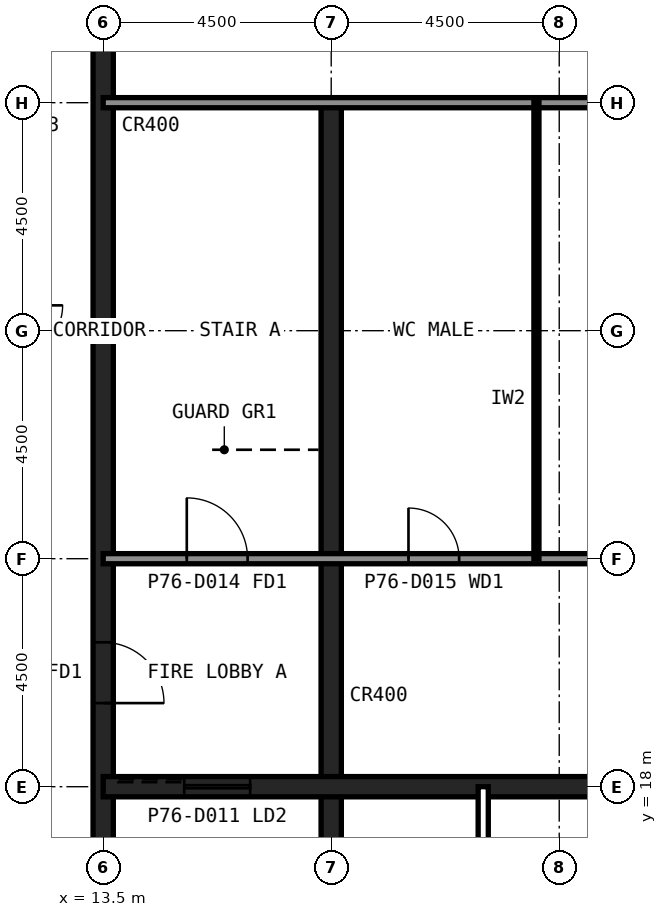
"""IFC4 building model, lengths in metres.
Left out: names, types, materials, properties, quantities, classifications, styles, units other than length and angle.
Written with IfcOpenShell. Run it as: python <this file> out.ifc"""

import sys

from ifc_helpers import new_model, si_unit, direction, frame, frame_2d, origin, place, context, subcontext, project, spatial, polyline, rectangle, outline, extrude, element, fill, save


model = new_model("IFC4")
c1 = context("Model", 3, precision=1e-05, world=origin(), true_north=direction((0.0, 1.0)))
c2 = subcontext(c1, "Body", "Model", "MODEL_VIEW")
j1 = project(units=[si_unit("LENGTHUNIT", "METRE"), si_unit("PLANEANGLEUNIT", "RADIAN")], contexts=[c1])
p1 = place(None, origin())
s1 = spatial("IfcSite", under=j1, at=p1, CompositionType="ELEMENT")
p2 = place(p1, origin())
s2 = spatial("IfcBuilding", under=s1, at=p2, CompositionType="ELEMENT")
p3 = place(p2, frame((0.0, 0.0, 320.1)))
s3 = spatial("IfcBuildingStorey", under=s2, at=p3, CompositionType="ELEMENT", Elevation=320.1)
p4 = place(p3, frame((13.5, 40.5, 0.0), z_axis=(0.0, 0.0, 1.0), x_axis=(0.0, -1.0, 0.0)))
e1 = element("IfcWall", 1, at=p4, inside=s3, PredefinedType="SHEAR", context=c2, shape_type="SweptSolid", body=[
    extrude(outline(polyline([(0.0, 0.0), (27.0, 0.0), (27.0, 9.277), (0.0, 17.377), (0.0, 0.0)])), frame((0.0, 0.2, 0.0), z_axis=(0.0, -1.0, 0.0), x_axis=(1.0, 0.0, 0.0)), (0.0, 0.0, 1.0), 0.4),
])
p5 = place(p4, frame((19.65, 0.0, 0.0)))
e2 = element("IfcOpeningElement", 2, at=p5, cuts=e1, PredefinedType="OPENING", context=c2, shape_type="SweptSolid", body=[
    extrude(rectangle(XDim=1.2, YDim=2.1, at=frame_2d((0.6, 1.05))), frame((0.0, 0.21, 0.0), z_axis=(0.0, -1.0, 0.0), x_axis=(1.0, 0.0, 0.0)), (0.0, 0.0, 1.0), 0.42),
])
p6 = place(p4, frame((5.85, 0.0, 0.0)))
e3 = element("IfcOpeningElement", 3, at=p6, cuts=e1, PredefinedType="OPENING", context=c2, shape_type="SweptSolid", body=[
    extrude(rectangle(XDim=1.8, YDim=2.1, at=frame_2d((0.9, 1.05))), frame((0.0, 0.21, 0.0), z_axis=(0.0, -1.0, 0.0), x_axis=(1.0, 0.0, 0.0)), (0.0, 0.0, 1.0), 0.42),
])
p7 = place(p3, frame((18.0, 13.5, 0.0), z_axis=(0.0, 0.0, 1.0), x_axis=(0.0, 1.0, 0.0)))
e4 = element("IfcWall", 4, at=p7, inside=s3, PredefinedType="SHEAR", context=c2, shape_type="SweptSolid", body=[
    extrude(outline(polyline([(0.0, 0.0), (18.0, 0.0), (18.0, 14.677), (0.0, 9.277), (0.0, 0.0)])), frame((0.0, 0.2, 0.0), z_axis=(0.0, -1.0, 0.0), x_axis=(1.0, 0.0, 0.0)), (0.0, 0.0, 1.0), 0.4),
])
p8 = place(p3, frame((13.5, 18.0, 0.0), z_axis=(0.0, 0.0, 1.0), x_axis=(1.0, 0.0, 0.0)))
e5 = element("IfcWall", 5, at=p8, inside=s3, PredefinedType="SHEAR", context=c2, shape_type="SweptSolid", body=[
    extrude(rectangle(XDim=27.0, YDim=0.4, at=frame_2d((13.5, 0.0))), origin(), (0.0, 0.0, 1.0), 10.627),
])
p9 = place(p8, frame((24.3, 0.0, 0.0)))
e6 = element("IfcOpeningElement", 6, at=p9, cuts=e5, PredefinedType="OPENING", context=c2, shape_type="SweptSolid", body=[
    extrude(rectangle(XDim=0.9, YDim=2.1, at=frame_2d((0.45, 1.05))), frame((0.0, 0.21, 0.0), z_axis=(0.0, -1.0, 0.0), x_axis=(1.0, 0.0, 0.0)), (0.0, 0.0, 1.0), 0.42),
])
p10 = place(p8, frame((1.6, 0.0, 0.0)))
e7 = element("IfcOpeningElement", 7, at=p10, cuts=e5, PredefinedType="OPENING", context=c2, shape_type="SweptSolid", body=[
    extrude(rectangle(XDim=1.3, YDim=2.2, at=frame_2d((0.65, 1.1))), frame((0.0, 0.21, 0.0), z_axis=(0.0, -1.0, 0.0), x_axis=(1.0, 0.0, 0.0)), (0.0, 0.0, 1.0), 0.42),
])
p11 = place(p3, frame((13.5, 22.5, 0.0), z_axis=(0.0, 0.0, 1.0), x_axis=(1.0, 0.0, 0.0)))
e8 = element("IfcWall", 8, at=p11, inside=s3, PredefinedType="SOLIDWALL", context=c2, shape_type="SweptSolid", body=[
    extrude(rectangle(XDim=27.0, YDim=0.2, at=frame_2d((13.5, 0.0))), origin(), (0.0, 0.0, 1.0), 11.827),
])
p12 = place(p11, frame((1.65, 0.0, 0.0)))
e9 = element("IfcOpeningElement", 9, at=p12, cuts=e8, PredefinedType="OPENING", context=c2, shape_type="SweptSolid", body=[
    extrude(rectangle(XDim=1.2, YDim=2.1, at=frame_2d((0.6, 1.05))), frame((0.0, 0.11, 0.0), z_axis=(0.0, -1.0, 0.0), x_axis=(1.0, 0.0, 0.0)), (0.0, 0.0, 1.0), 0.22),
])
p13 = place(p11, frame((6.025, 0.0, 0.0)))
e10 = element("IfcOpeningElement", 10, at=p13, cuts=e8, PredefinedType="OPENING", context=c2, shape_type="SweptSolid", body=[
    extrude(rectangle(XDim=1.0, YDim=2.1, at=frame_2d((0.5, 1.05))), frame((0.0, 0.11, 0.0), z_axis=(0.0, -1.0, 0.0), x_axis=(1.0, 0.0, 0.0)), (0.0, 0.0, 1.0), 0.22),
])
p14 = place(p11, frame((10.525, 0.0, 0.0)))
e11 = element("IfcOpeningElement", 11, at=p14, cuts=e8, PredefinedType="OPENING", context=c2, shape_type="SweptSolid", body=[
    extrude(rectangle(XDim=1.0, YDim=2.1, at=frame_2d((0.5, 1.05))), frame((0.0, 0.11, 0.0), z_axis=(0.0, -1.0, 0.0), x_axis=(1.0, 0.0, 0.0)), (0.0, 0.0, 1.0), 0.22),
])
p15 = place(p11, frame((19.75, 0.0, 0.0)))
e12 = element("IfcOpeningElement", 12, at=p15, cuts=e8, PredefinedType="OPENING", context=c2, shape_type="SweptSolid", body=[
    extrude(rectangle(XDim=1.0, YDim=2.1, at=frame_2d((0.5, 1.05))), frame((0.0, 0.11, 0.0), z_axis=(0.0, -1.0, 0.0), x_axis=(1.0, 0.0, 0.0)), (0.0, 0.0, 1.0), 0.22),
])
p16 = place(p11, frame((15.05, 0.0, 0.0)))
e13 = element("IfcOpeningElement", 13, at=p16, cuts=e8, PredefinedType="OPENING", context=c2, shape_type="SweptSolid", body=[
    extrude(rectangle(XDim=1.4, YDim=2.4, at=frame_2d((0.7, 1.2))), frame((0.0, 0.11, 0.0), z_axis=(0.0, -1.0, 0.0), x_axis=(1.0, 0.0, 0.0)), (0.0, 0.0, 1.0), 0.22),
])
p17 = place(p3, frame((13.5, 31.5, 0.0), z_axis=(0.0, 0.0, 1.0), x_axis=(1.0, 0.0, 0.0)))
e14 = element("IfcWall", 14, at=p17, inside=s3, PredefinedType="SOLIDWALL", context=c2, shape_type="SweptSolid", body=[
    extrude(rectangle(XDim=27.0, YDim=0.2, at=frame_2d((13.5, 0.0))), origin(), (0.0, 0.0, 1.0), 14.527),
])
p18 = place(p17, frame((24.15, 0.0, 0.0)))
e15 = element("IfcOpeningElement", 15, at=p18, cuts=e14, PredefinedType="OPENING", context=c2, shape_type="SweptSolid", body=[
    extrude(rectangle(XDim=1.2, YDim=2.1, at=frame_2d((0.6, 1.05))), frame((0.0, 0.11, 0.0), z_axis=(0.0, -1.0, 0.0), x_axis=(1.0, 0.0, 0.0)), (0.0, 0.0, 1.0), 0.22),
])
p19 = place(p17, frame((15.3, 0.0, 0.0)))
e16 = element("IfcOpeningElement", 16, at=p19, cuts=e14, PredefinedType="OPENING", context=c2, shape_type="SweptSolid", body=[
    extrude(rectangle(XDim=0.9, YDim=2.1, at=frame_2d((0.45, 1.05))), frame((0.0, 0.11, 0.0), z_axis=(0.0, -1.0, 0.0), x_axis=(1.0, 0.0, 0.0)), (0.0, 0.0, 1.0), 0.22),
])
p20 = place(p17, frame((19.8, 0.0, 0.0)))
e17 = element("IfcOpeningElement", 17, at=p20, cuts=e14, PredefinedType="OPENING", context=c2, shape_type="SweptSolid", body=[
    extrude(rectangle(XDim=0.9, YDim=2.1, at=frame_2d((0.45, 1.05))), frame((0.0, 0.11, 0.0), z_axis=(0.0, -1.0, 0.0), x_axis=(1.0, 0.0, 0.0)), (0.0, 0.0, 1.0), 0.22),
])
p21 = place(p3, frame((17.739, -0.63, 0.0), z_axis=(0.0, 0.0, 1.0), x_axis=(-0.707106781187, 0.707106781187, 0.0)))
e18 = element("IfcWall", 18, at=p21, inside=s3, PredefinedType="SOLIDWALL", context=c2, shape_type="SweptSolid", body=[
    extrude(outline(polyline([(0.0, 0.0), (25.978, 0.0), (25.978, 12.722), (0.0, 7.211), (0.0, 0.0)])), frame((0.0, 0.15, 0.0), z_axis=(0.0, -1.0, 0.0), x_axis=(1.0, 0.0, 0.0)), (0.0, 0.0, 1.0), 0.3),
])
p22 = place(p21, frame((0.424, 0.0, 1.2)))
e19 = element("IfcOpeningElement", 19, at=p22, cuts=e18, PredefinedType="OPENING", context=c2, shape_type="SweptSolid", body=[
    extrude(rectangle(XDim=2.4, YDim=2.4, at=frame_2d((1.2, 1.2))), frame((0.0, 0.16, 0.0), z_axis=(0.0, -1.0, 0.0), x_axis=(1.0, 0.0, 0.0)), (0.0, 0.0, 1.0), 0.32),
])
p23 = place(p21, frame((3.671, 0.0, 1.2)))
e20 = element("IfcOpeningElement", 20, at=p23, cuts=e18, PredefinedType="OPENING", context=c2, shape_type="SweptSolid", body=[
    extrude(rectangle(XDim=2.4, YDim=2.4, at=frame_2d((1.2, 1.2))), frame((0.0, 0.16, 0.0), z_axis=(0.0, -1.0, 0.0), x_axis=(1.0, 0.0, 0.0)), (0.0, 0.0, 1.0), 0.32),
])
p24 = place(p21, frame((6.918, 0.0, 1.2)))
e21 = element("IfcOpeningElement", 21, at=p24, cuts=e18, PredefinedType="OPENING", context=c2, shape_type="SweptSolid", body=[
    extrude(rectangle(XDim=2.4, YDim=2.4, at=frame_2d((1.2, 1.2))), frame((0.0, 0.16, 0.0), z_axis=(0.0, -1.0, 0.0), x_axis=(1.0, 0.0, 0.0)), (0.0, 0.0, 1.0), 0.32),
])
p25 = place(p21, frame((10.165, 0.0, 1.2)))
e22 = element("IfcOpeningElement", 22, at=p25, cuts=e18, PredefinedType="OPENING", context=c2, shape_type="SweptSolid", body=[
    extrude(rectangle(XDim=2.4, YDim=2.4, at=frame_2d((1.2, 1.2))), frame((0.0, 0.16, 0.0), z_axis=(0.0, -1.0, 0.0), x_axis=(1.0, 0.0, 0.0)), (0.0, 0.0, 1.0), 0.32),
])
p26 = place(p21, frame((13.412, 0.0, 5.25)))
e23 = element("IfcOpeningElement", 23, at=p26, cuts=e18, PredefinedType="OPENING", context=c2, shape_type="SweptSolid", body=[
    extrude(rectangle(XDim=2.4, YDim=2.4, at=frame_2d((1.2, 1.2))), frame((0.0, 0.16, 0.0), z_axis=(0.0, -1.0, 0.0), x_axis=(1.0, 0.0, 0.0)), (0.0, 0.0, 1.0), 0.32),
])
p27 = place(p21, frame((16.66, 0.0, 5.35)))
e24 = element("IfcOpeningElement", 24, at=p27, cuts=e18, PredefinedType="OPENING", context=c2, shape_type="SweptSolid", body=[
    extrude(rectangle(XDim=2.4, YDim=2.4, at=frame_2d((1.2, 1.2))), frame((0.0, 0.16, 0.0), z_axis=(0.0, -1.0, 0.0), x_axis=(1.0, 0.0, 0.0)), (0.0, 0.0, 1.0), 0.32),
])
p28 = place(p21, frame((19.907, 0.0, 1.2)))
e25 = element("IfcOpeningElement", 25, at=p28, cuts=e18, PredefinedType="OPENING", context=c2, shape_type="SweptSolid", body=[
    extrude(rectangle(XDim=2.4, YDim=2.4, at=frame_2d((1.2, 1.2))), frame((0.0, 0.16, 0.0), z_axis=(0.0, -1.0, 0.0), x_axis=(1.0, 0.0, 0.0)), (0.0, 0.0, 1.0), 0.32),
])
p29 = place(p21, frame((23.154, 0.0, 1.2)))
e26 = element("IfcOpeningElement", 26, at=p29, cuts=e18, PredefinedType="OPENING", context=c2, shape_type="SweptSolid", body=[
    extrude(rectangle(XDim=2.4, YDim=2.4, at=frame_2d((1.2, 1.2))), frame((0.0, 0.16, 0.0), z_axis=(0.0, -1.0, 0.0), x_axis=(1.0, 0.0, 0.0)), (0.0, 0.0, 1.0), 0.32),
])
p30 = place(p3, frame((21.0, 13.5, 0.0), z_axis=(0.0, 0.0, 1.0), x_axis=(0.0, 1.0, 0.0)))
e27 = element("IfcWall", 27, at=p30, inside=s3, PredefinedType="PARTITIONING", context=c2, shape_type="SweptSolid", body=[
    extrude(rectangle(XDim=4.5, YDim=0.2, at=frame_2d((2.25, 0.0))), origin(), (0.0, 0.0, 1.0), 4.2),
])
p31 = place(p3, frame((22.05, 22.5, 0.0), z_axis=(0.0, 0.0, 1.0), x_axis=(0.0, 1.0, 0.0)))
e28 = element("IfcWall", 28, at=p31, inside=s3, PredefinedType="PLUMBINGWALL", context=c2, shape_type="SweptSolid", body=[
    extrude(rectangle(XDim=9.0, YDim=0.1, at=frame_2d((4.5, 0.0))), origin(), (0.0, 0.0, 1.0), 4.246),
])
p32 = place(p5, origin())
e29 = element("IfcDoor", 29, at=p32, inside=s3, OperationType="SINGLE_SWING_RIGHT", PredefinedType="DOOR", context=c2, shape_type="SweptSolid", body=[
    extrude(rectangle(XDim=1.2, YDim=2.1, at=frame_2d((0.6, 1.05))), frame((0.0, 0.025, 0.0), z_axis=(0.0, -1.0, 0.0), x_axis=(1.0, 0.0, 0.0)), (0.0, 0.0, 1.0), 0.05),
])
fill(e2, e29)
p33 = place(p12, origin())
e30 = element("IfcDoor", 30, at=p33, inside=s3, OperationType="SINGLE_SWING_LEFT", PredefinedType="DOOR", context=c2, shape_type="SweptSolid", body=[
    extrude(rectangle(XDim=1.2, YDim=2.1, at=frame_2d((0.6, 1.05))), frame((0.0, 0.025, 0.0), z_axis=(0.0, -1.0, 0.0), x_axis=(1.0, 0.0, 0.0)), (0.0, 0.0, 1.0), 0.05),
])
fill(e9, e30)
p34 = place(p13, origin())
e31 = element("IfcDoor", 31, at=p34, inside=s3, OperationType="SINGLE_SWING_LEFT", PredefinedType="DOOR", context=c2, shape_type="SweptSolid", body=[
    extrude(rectangle(XDim=1.0, YDim=2.1, at=frame_2d((0.5, 1.05))), frame((0.0, 0.025, 0.0), z_axis=(0.0, -1.0, 0.0), x_axis=(1.0, 0.0, 0.0)), (0.0, 0.0, 1.0), 0.05),
])
fill(e10, e31)
p35 = place(p10, origin())
e32 = element("IfcDoor", 32, at=p35, inside=s3, OperationType="SLIDING_TO_LEFT", PredefinedType="DOOR", context=c2, shape_type="SweptSolid", body=[
    extrude(rectangle(XDim=1.3, YDim=2.2, at=frame_2d((0.65, 1.1))), frame((0.0, 0.025, 0.0), z_axis=(0.0, -1.0, 0.0), x_axis=(1.0, 0.0, 0.0)), (0.0, 0.0, 1.0), 0.05),
])
fill(e7, e32)
save(model, sys.argv[1])
